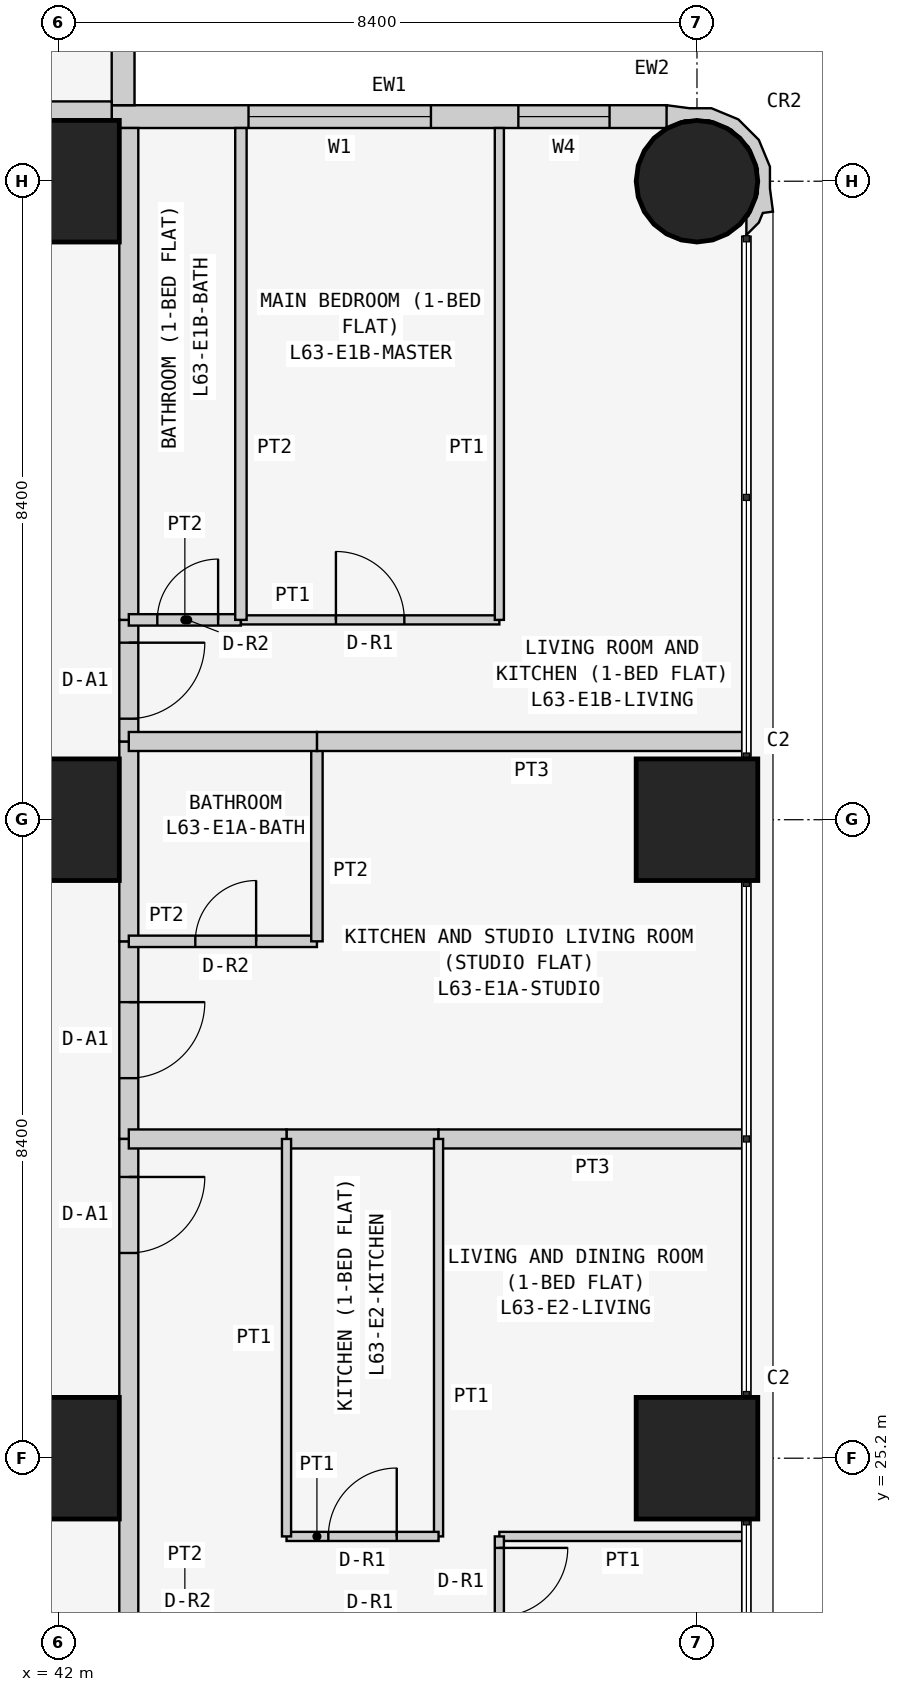
"""IFC4 building model, lengths in metres.
Left out: names, types, materials, properties, quantities, classifications, styles, units other than length and angle.
Written with IfcOpenShell. Run it as: python <this file> out.ifc"""

import sys

from ifc_helpers import new_model, si_unit, direction, frame, frame_2d, origin, origin_2d, place, context, subcontext, project, spatial, polyline, rectangle, circle, outline, extrude, element, fill, save


model = new_model("IFC4")
c1 = context("Model", 3, precision=1e-05, world=origin(), true_north=direction((0.0, 1.0)))
c2 = subcontext(c1, "Body", "Model", "MODEL_VIEW")
j1 = project(units=[si_unit("LENGTHUNIT", "METRE"), si_unit("PLANEANGLEUNIT", "RADIAN")], contexts=[c1])
p1 = place(None, origin())
s1 = spatial("IfcSite", under=j1, at=p1, CompositionType="ELEMENT")
p2 = place(p1, origin())
s2 = spatial("IfcBuilding", under=s1, at=p2, CompositionType="ELEMENT")
p3 = place(p2, frame((0.0, 0.0, 240.9)))
s3 = spatial("IfcBuildingStorey", under=s2, at=p3, CompositionType="ELEMENT", Elevation=240.9)
for number, where, z_axis, x_axis in (
    (1, (42.0, 25.2, 0.0), (0.0, 0.0, 1.0), (1.0, 0.0, 0.0)),
    (2, (42.0, 33.6, 0.0), (0.0, 0.0, 1.0), (1.0, 0.0, 0.0)),
    (3, (42.0, 42.0, 0.0), (0.0, 0.0, 1.0), (1.0, 0.0, 0.0)),
    (4, (50.4, 25.2, 0.0), (0.0, 0.0, 1.0), (1.0, 0.0, 0.0)),
    (5, (50.4, 33.6, 0.0), (0.0, 0.0, 1.0), (1.0, 0.0, 0.0)),
):
    element("IfcColumn", number, at=place(p3, frame(where, z_axis=z_axis, x_axis=x_axis)), inside=s3, PredefinedType="COLUMN", context=c2, shape_type="SweptSolid", body=[
        extrude(rectangle(XDim=1.6, YDim=1.6, at=origin_2d()), origin(), (0.0, 0.0, 1.0), 3.6),
    ])
p4 = place(p3, frame((50.4, 42.0, 0.0), z_axis=(0.0, 0.0, 1.0), x_axis=(1.0, 0.0, 0.0)))
e6 = element("IfcColumn", 6, at=p4, inside=s3, PredefinedType="COLUMN", context=c2, shape_type="SweptSolid", body=[
    extrude(circle(Radius=0.8, at=origin_2d()), origin(), (0.0, 0.0, 1.0), 3.6),
])
p5 = place(p3, frame((50.0, 42.85, 0.0), z_axis=(0.0, 0.0, 1.0), x_axis=(-1.0, 0.0, 0.0)))
e7 = element("IfcWall", 7, at=p5, inside=s3, PredefinedType="SOLIDWALL", context=c2, shape_type="SweptSolid", body=[
    extrude(rectangle(XDim=7.3, YDim=0.3, at=frame_2d((3.65, 0.0))), origin(), (0.0, 0.0, 1.0), 3.45),
])
p6 = place(p5, frame((3.1, 0.0, 0.9)))
e8 = element("IfcOpeningElement", 8, at=p6, cuts=e7, PredefinedType="OPENING", context=c2, shape_type="SweptSolid", body=[
    extrude(rectangle(XDim=2.4, YDim=1.5, at=frame_2d((1.2, 0.75))), frame((0.0, 0.16, 0.0), z_axis=(0.0, -1.0, 0.0), x_axis=(1.0, 0.0, 0.0)), (0.0, 0.0, 1.0), 0.32),
])
p7 = place(p5, frame((0.75, 0.0, 0.9)))
e9 = element("IfcOpeningElement", 9, at=p7, cuts=e7, PredefinedType="OPENING", context=c2, shape_type="SweptSolid", body=[
    extrude(rectangle(XDim=1.2, YDim=1.5, at=frame_2d((0.6, 0.75))), frame((0.0, 0.16, 0.0), z_axis=(0.0, -1.0, 0.0), x_axis=(1.0, 0.0, 0.0)), (0.0, 0.0, 1.0), 0.32),
])
p8 = place(p3, frame((42.85, 43.0, 0.0), z_axis=(0.0, 0.0, 1.0), x_axis=(0.0, 1.0, 0.0)))
e10 = element("IfcWall", 10, at=p8, inside=s3, PredefinedType="SOLIDWALL", context=c2, shape_type="SweptSolid", body=[
    extrude(rectangle(XDim=7.0, YDim=0.3, at=frame_2d((3.5, 0.0))), origin(), (0.0, 0.0, 1.0), 3.45),
])
p9 = place(p8, frame((1.5, 0.0, 0.9)))
e11 = element("IfcOpeningElement", 11, at=p9, cuts=e10, PredefinedType="OPENING", context=c2, shape_type="SweptSolid", body=[
    extrude(rectangle(XDim=2.4, YDim=1.5, at=frame_2d((1.2, 0.75))), frame((0.0, 0.16, 0.0), z_axis=(0.0, -1.0, 0.0), x_axis=(1.0, 0.0, 0.0)), (0.0, 0.0, 1.0), 0.32),
])
p10 = place(p8, frame((5.05, 0.0, 0.9)))
e12 = element("IfcOpeningElement", 12, at=p10, cuts=e10, PredefinedType="OPENING", context=c2, shape_type="SweptSolid", body=[
    extrude(rectangle(XDim=1.2, YDim=1.5, at=frame_2d((0.6, 0.75))), frame((0.0, 0.16, 0.0), z_axis=(0.0, -1.0, 0.0), x_axis=(1.0, 0.0, 0.0)), (0.0, 0.0, 1.0), 0.32),
])
p11 = place(p3, frame((50.995, 41.352, 0.0), z_axis=(0.0, 0.0, 1.0), x_axis=(0.93923434088, 0.343276641956, 0.0)))
e13 = element("IfcWall", 13, at=p11, inside=s3, PredefinedType="SOLIDWALL", context=c2, shape_type="SweptSolid", body=[
    extrude(outline(polyline([(0.532, 0.393), (0.631, 0.663), (0.614, 1.044), (0.453, 1.391), (0.172, 1.649), (-0.098, 1.748), (-0.369, 1.89), (-0.509, 1.621), (-0.491, 1.615), (-0.479, 1.609), (-0.211, 1.62), (0.088, 1.511), (0.323, 1.295), (0.457, 1.006), (0.47, 0.688), (0.361, 0.389), (0.145, 0.154), (0.108, 0.136), (0.031, -0.075), (0.241, 0.023), (0.333, 0.124), (0.465, 0.094), (0.532, 0.393)])), origin(), (0.0, 0.0, 1.0), 3.45),
])
p12 = place(p3, frame((35.829, 42.925, 0.0), z_axis=(0.0, 0.0, 1.0), x_axis=(1.0, 0.0, 0.0)))
e14 = element("IfcWall", 14, at=p12, inside=s3, PredefinedType="PARTITIONING", context=c2, shape_type="SweptSolid", body=[
    extrude(rectangle(XDim=6.871, YDim=0.25, at=frame_2d((3.436, 0.0))), origin(), (0.0, 0.0, 1.0), 3.45),
])
p13 = place(p3, frame((42.925, 32.0, 0.0), z_axis=(0.0, 0.0, 1.0), x_axis=(0.0, -1.0, 0.0)))
e15 = element("IfcWall", 15, at=p13, inside=s3, PredefinedType="PARTITIONING", context=c2, shape_type="SweptSolid", body=[
    extrude(rectangle(XDim=2.6, YDim=0.25, at=frame_2d((1.3, 0.0))), origin(), (0.0, 0.0, 1.0), 3.45),
])
p14 = place(p13, frame((0.8, 0.0, 0.0)))
e16 = element("IfcOpeningElement", 16, at=p14, cuts=e15, PredefinedType="OPENING", context=c2, shape_type="SweptSolid", body=[
    extrude(rectangle(XDim=1.0, YDim=2.1, at=frame_2d((0.5, 1.05))), frame((0.0, 0.135, 0.0), z_axis=(0.0, -1.0, 0.0), x_axis=(1.0, 0.0, 0.0)), (0.0, 0.0, 1.0), 0.27),
])
p15 = place(p3, frame((42.925, 34.629, 0.0), z_axis=(0.0, 0.0, 1.0), x_axis=(0.0, -1.0, 0.0)))
e17 = element("IfcWall", 17, at=p15, inside=s3, PredefinedType="PARTITIONING", context=c2, shape_type="SweptSolid", body=[
    extrude(rectangle(XDim=2.629, YDim=0.25, at=frame_2d((1.314, 0.0))), origin(), (0.0, 0.0, 1.0), 3.45),
])
p16 = place(p3, frame((42.925, 36.229, 0.0), z_axis=(0.0, 0.0, 1.0), x_axis=(0.0, -1.0, 0.0)))
e18 = element("IfcWall", 18, at=p16, inside=s3, PredefinedType="PARTITIONING", context=c2, shape_type="SweptSolid", body=[
    extrude(rectangle(XDim=1.6, YDim=0.25, at=frame_2d((0.8, 0.0))), origin(), (0.0, 0.0, 1.0), 3.45),
])
p17 = place(p16, frame((0.3, 0.0, 0.0)))
e19 = element("IfcOpeningElement", 19, at=p17, cuts=e18, PredefinedType="OPENING", context=c2, shape_type="SweptSolid", body=[
    extrude(rectangle(XDim=1.0, YDim=2.1, at=frame_2d((0.5, 1.05))), frame((0.0, 0.135, 0.0), z_axis=(0.0, -1.0, 0.0), x_axis=(1.0, 0.0, 0.0)), (0.0, 0.0, 1.0), 0.27),
])
p18 = place(p3, frame((42.925, 42.7, 0.0), z_axis=(0.0, 0.0, 1.0), x_axis=(0.0, -1.0, 0.0)))
e20 = element("IfcWall", 20, at=p18, inside=s3, PredefinedType="PARTITIONING", context=c2, shape_type="SweptSolid", body=[
    extrude(rectangle(XDim=6.471, YDim=0.25, at=frame_2d((3.235, 0.0))), origin(), (0.0, 0.0, 1.0), 3.45),
])
p19 = place(p3, frame((42.925, 29.4, 0.0), z_axis=(0.0, 0.0, 1.0), x_axis=(0.0, -1.0, 0.0)))
e21 = element("IfcWall", 21, at=p19, inside=s3, PredefinedType="PARTITIONING", context=c2, shape_type="SweptSolid", body=[
    extrude(rectangle(XDim=6.429, YDim=0.25, at=frame_2d((3.214, 0.0))), origin(), (0.0, 0.0, 1.0), 3.45),
])
p20 = place(p19, frame((0.5, 0.0, 0.0)))
e22 = element("IfcOpeningElement", 22, at=p20, cuts=e21, PredefinedType="OPENING", context=c2, shape_type="SweptSolid", body=[
    extrude(rectangle(XDim=1.0, YDim=2.1, at=frame_2d((0.5, 1.05))), frame((0.0, 0.135, 0.0), z_axis=(0.0, -1.0, 0.0), x_axis=(1.0, 0.0, 0.0)), (0.0, 0.0, 1.0), 0.27),
])
p21 = place(p3, frame((42.925, 32.0, 0.0), z_axis=(0.0, 0.0, 1.0), x_axis=(1.0, 0.0, 0.0)))
e23 = element("IfcWall", 23, at=p21, inside=s3, PredefinedType="PARTITIONING", context=c2, shape_type="SweptSolid", body=[
    extrude(rectangle(XDim=2.475, YDim=0.15, at=frame_2d((1.237, 0.0))), origin(), (0.0, 0.0, 1.0), 3.45),
])
p22 = place(p21, frame((0.875, 0.0, 0.0)))
e24 = element("IfcOpeningElement", 24, at=p22, cuts=e23, PredefinedType="OPENING", context=c2, shape_type="SweptSolid", body=[
    extrude(rectangle(XDim=0.8, YDim=2.1, at=frame_2d((0.4, 1.05))), frame((0.0, 0.085, 0.0), z_axis=(0.0, -1.0, 0.0), x_axis=(1.0, 0.0, 0.0)), (0.0, 0.0, 1.0), 0.17),
])
p23 = place(p3, frame((45.4, 32.0, 0.0), z_axis=(0.0, 0.0, 1.0), x_axis=(0.0, 1.0, 0.0)))
e25 = element("IfcWall", 25, at=p23, inside=s3, PredefinedType="PARTITIONING", context=c2, shape_type="SweptSolid", body=[
    extrude(rectangle(XDim=2.629, YDim=0.15, at=frame_2d((1.314, 0.0))), origin(), (0.0, 0.0, 1.0), 3.45),
])
p24 = place(p3, frame((45.4, 34.629, 0.0), z_axis=(0.0, 0.0, 1.0), x_axis=(1.0, 0.0, 0.0)))
e26 = element("IfcWall", 26, at=p24, inside=s3, PredefinedType="PARTITIONING", context=c2, shape_type="SweptSolid", body=[
    extrude(rectangle(XDim=5.65, YDim=0.25, at=frame_2d((2.825, 0.0))), origin(), (0.0, 0.0, 1.0), 3.45),
])
p25 = place(p3, frame((47.0, 29.4, 0.0), z_axis=(0.0, 0.0, 1.0), x_axis=(-1.0, 0.0, 0.0)))
e27 = element("IfcWall", 27, at=p25, inside=s3, PredefinedType="PARTITIONING", context=c2, shape_type="SweptSolid", body=[
    extrude(rectangle(XDim=2.0, YDim=0.25, at=frame_2d((1.0, 0.0))), origin(), (0.0, 0.0, 1.0), 3.45),
])
p26 = place(p3, frame((45.0, 29.4, 0.0), z_axis=(0.0, 0.0, 1.0), x_axis=(-1.0, 0.0, 0.0)))
e28 = element("IfcWall", 28, at=p26, inside=s3, PredefinedType="PARTITIONING", context=c2, shape_type="SweptSolid", body=[
    extrude(rectangle(XDim=2.075, YDim=0.25, at=frame_2d((1.038, 0.0))), origin(), (0.0, 0.0, 1.0), 3.45),
])
p27 = place(p3, frame((51.05, 29.4, 0.0), z_axis=(0.0, 0.0, 1.0), x_axis=(-1.0, 0.0, 0.0)))
e29 = element("IfcWall", 29, at=p27, inside=s3, PredefinedType="PARTITIONING", context=c2, shape_type="SweptSolid", body=[
    extrude(rectangle(XDim=4.05, YDim=0.25, at=frame_2d((2.025, 0.0))), origin(), (0.0, 0.0, 1.0), 3.45),
])
p28 = place(p3, frame((45.4, 34.629, 0.0), z_axis=(0.0, 0.0, 1.0), x_axis=(-1.0, 0.0, 0.0)))
e30 = element("IfcWall", 30, at=p28, inside=s3, PredefinedType="PARTITIONING", context=c2, shape_type="SweptSolid", body=[
    extrude(rectangle(XDim=2.475, YDim=0.25, at=frame_2d((1.237, 0.0))), origin(), (0.0, 0.0, 1.0), 3.45),
])
p29 = place(p3, frame((42.925, 36.229, 0.0), z_axis=(0.0, 0.0, 1.0), x_axis=(1.0, 0.0, 0.0)))
e31 = element("IfcWall", 31, at=p29, inside=s3, PredefinedType="PARTITIONING", context=c2, shape_type="SweptSolid", body=[
    extrude(rectangle(XDim=1.475, YDim=0.15, at=frame_2d((0.737, 0.0))), origin(), (0.0, 0.0, 1.0), 3.45),
])
p30 = place(p29, frame((0.375, 0.0, 0.0)))
e32 = element("IfcOpeningElement", 32, at=p30, cuts=e31, PredefinedType="OPENING", context=c2, shape_type="SweptSolid", body=[
    extrude(rectangle(XDim=0.8, YDim=2.1, at=frame_2d((0.4, 1.05))), frame((0.0, 0.085, 0.0), z_axis=(0.0, -1.0, 0.0), x_axis=(1.0, 0.0, 0.0)), (0.0, 0.0, 1.0), 0.17),
])
p31 = place(p3, frame((44.4, 36.229, 0.0), z_axis=(0.0, 0.0, 1.0), x_axis=(1.0, 0.0, 0.0)))
e33 = element("IfcWall", 33, at=p31, inside=s3, PredefinedType="PARTITIONING", context=c2, shape_type="SweptSolid", body=[
    extrude(rectangle(XDim=3.4, YDim=0.12, at=frame_2d((1.7, 0.0))), origin(), (0.0, 0.0, 1.0), 3.45),
])
p32 = place(p31, frame((1.25, 0.0, 0.0)))
e34 = element("IfcOpeningElement", 34, at=p32, cuts=e33, PredefinedType="OPENING", context=c2, shape_type="SweptSolid", body=[
    extrude(rectangle(XDim=0.9, YDim=2.1, at=frame_2d((0.45, 1.05))), frame((0.0, 0.07, 0.0), z_axis=(0.0, -1.0, 0.0), x_axis=(1.0, 0.0, 0.0)), (0.0, 0.0, 1.0), 0.14),
])
p33 = place(p3, frame((47.8, 36.229, 0.0), z_axis=(0.0, 0.0, 1.0), x_axis=(0.0, 1.0, 0.0)))
e35 = element("IfcWall", 35, at=p33, inside=s3, PredefinedType="PARTITIONING", context=c2, shape_type="SweptSolid", body=[
    extrude(rectangle(XDim=6.471, YDim=0.12, at=frame_2d((3.235, 0.0))), origin(), (0.0, 0.0, 1.0), 3.45),
])
p34 = place(p3, frame((44.4, 36.229, 0.0), z_axis=(0.0, 0.0, 1.0), x_axis=(0.0, 1.0, 0.0)))
e36 = element("IfcWall", 36, at=p34, inside=s3, PredefinedType="PARTITIONING", context=c2, shape_type="SweptSolid", body=[
    extrude(rectangle(XDim=6.471, YDim=0.15, at=frame_2d((3.235, 0.0))), origin(), (0.0, 0.0, 1.0), 3.45),
])
p35 = place(p3, frame((47.0, 29.4, 0.0), z_axis=(0.0, 0.0, 1.0), x_axis=(0.0, -1.0, 0.0)))
e37 = element("IfcWall", 37, at=p35, inside=s3, PredefinedType="PARTITIONING", context=c2, shape_type="SweptSolid", body=[
    extrude(rectangle(XDim=5.229, YDim=0.12, at=frame_2d((2.615, 0.0))), origin(), (0.0, 0.0, 1.0), 3.45),
])
p36 = place(p3, frame((47.0, 24.171, 0.0), z_axis=(0.0, 0.0, 1.0), x_axis=(-1.0, 0.0, 0.0)))
e38 = element("IfcWall", 38, at=p36, inside=s3, PredefinedType="PARTITIONING", context=c2, shape_type="SweptSolid", body=[
    extrude(rectangle(XDim=2.0, YDim=0.12, at=frame_2d((1.0, 0.0))), origin(), (0.0, 0.0, 1.0), 3.45),
])
p37 = place(p36, frame((0.55, 0.0, 0.0)))
e39 = element("IfcOpeningElement", 39, at=p37, cuts=e38, PredefinedType="OPENING", context=c2, shape_type="SweptSolid", body=[
    extrude(rectangle(XDim=0.9, YDim=2.1, at=frame_2d((0.45, 1.05))), frame((0.0, 0.07, 0.0), z_axis=(0.0, -1.0, 0.0), x_axis=(1.0, 0.0, 0.0)), (0.0, 0.0, 1.0), 0.14),
])
p38 = place(p3, frame((45.0, 24.171, 0.0), z_axis=(0.0, 0.0, 1.0), x_axis=(0.0, 1.0, 0.0)))
e40 = element("IfcWall", 40, at=p38, inside=s3, PredefinedType="PARTITIONING", context=c2, shape_type="SweptSolid", body=[
    extrude(rectangle(XDim=5.229, YDim=0.12, at=frame_2d((2.615, 0.0))), origin(), (0.0, 0.0, 1.0), 3.45),
])
p39 = place(p3, frame((51.05, 24.171, 0.0), z_axis=(0.0, 0.0, 1.0), x_axis=(-1.0, 0.0, 0.0)))
e41 = element("IfcWall", 41, at=p39, inside=s3, PredefinedType="PARTITIONING", context=c2, shape_type="SweptSolid", body=[
    extrude(rectangle(XDim=3.25, YDim=0.12, at=frame_2d((1.625, 0.0))), origin(), (0.0, 0.0, 1.0), 3.45),
])
p40 = place(p3, frame((47.8, 24.171, 0.0), z_axis=(0.0, 0.0, 1.0), x_axis=(0.0, -1.0, 0.0)))
e42 = element("IfcWall", 42, at=p40, inside=s3, PredefinedType="PARTITIONING", context=c2, shape_type="SweptSolid", body=[
    extrude(rectangle(XDim=1.2, YDim=0.12, at=frame_2d((0.6, 0.0))), origin(), (0.0, 0.0, 1.0), 3.45),
])
p41 = place(p40, frame((0.151, 0.0, 0.0)))
e43 = element("IfcOpeningElement", 43, at=p41, cuts=e42, PredefinedType="OPENING", context=c2, shape_type="SweptSolid", body=[
    extrude(rectangle(XDim=0.9, YDim=2.1, at=frame_2d((0.45, 1.05))), frame((0.0, 0.07, 0.0), z_axis=(0.0, -1.0, 0.0), x_axis=(1.0, 0.0, 0.0)), (0.0, 0.0, 1.0), 0.14),
])
p42 = place(p6, origin())
e44 = element("IfcWindow", 44, at=p42, inside=s3, PartitioningType="SINGLE_PANEL", PredefinedType="WINDOW", context=c2, shape_type="SweptSolid", body=[
    extrude(rectangle(XDim=2.4, YDim=1.5, at=frame_2d((1.2, 0.75))), frame((0.0, 0.03, 0.0), z_axis=(0.0, -1.0, 0.0), x_axis=(1.0, 0.0, 0.0)), (0.0, 0.0, 1.0), 0.06),
])
fill(e8, e44)
p43 = place(p7, origin())
e45 = element("IfcWindow", 45, at=p43, inside=s3, PartitioningType="SINGLE_PANEL", PredefinedType="WINDOW", context=c2, shape_type="SweptSolid", body=[
    extrude(rectangle(XDim=1.2, YDim=1.5, at=frame_2d((0.6, 0.75))), frame((0.0, 0.03, 0.0), z_axis=(0.0, -1.0, 0.0), x_axis=(1.0, 0.0, 0.0)), (0.0, 0.0, 1.0), 0.06),
])
fill(e9, e45)
p44 = place(p14, origin())
e46 = element("IfcDoor", 46, at=p44, inside=s3, OperationType="SINGLE_SWING_LEFT", PredefinedType="DOOR", context=c2, shape_type="SweptSolid", body=[
    extrude(rectangle(XDim=1.0, YDim=2.1, at=frame_2d((0.5, 1.05))), frame((0.0, 0.025, 0.0), z_axis=(0.0, -1.0, 0.0), x_axis=(1.0, 0.0, 0.0)), (0.0, 0.0, 1.0), 0.05),
])
fill(e16, e46)
p45 = place(p22, origin())
e47 = element("IfcDoor", 47, at=p45, inside=s3, OperationType="SINGLE_SWING_RIGHT", PredefinedType="DOOR", context=c2, shape_type="SweptSolid", body=[
    extrude(rectangle(XDim=0.8, YDim=2.1, at=frame_2d((0.4, 1.05))), frame((0.0, 0.025, 0.0), z_axis=(0.0, -1.0, 0.0), x_axis=(1.0, 0.0, 0.0)), (0.0, 0.0, 1.0), 0.05),
])
fill(e24, e47)
p46 = place(p17, origin())
e48 = element("IfcDoor", 48, at=p46, inside=s3, OperationType="SINGLE_SWING_LEFT", PredefinedType="DOOR", context=c2, shape_type="SweptSolid", body=[
    extrude(rectangle(XDim=1.0, YDim=2.1, at=frame_2d((0.5, 1.05))), frame((0.0, 0.025, 0.0), z_axis=(0.0, -1.0, 0.0), x_axis=(1.0, 0.0, 0.0)), (0.0, 0.0, 1.0), 0.05),
])
fill(e19, e48)
p47 = place(p30, origin())
e49 = element("IfcDoor", 49, at=p47, inside=s3, OperationType="SINGLE_SWING_RIGHT", PredefinedType="DOOR", context=c2, shape_type="SweptSolid", body=[
    extrude(rectangle(XDim=0.8, YDim=2.1, at=frame_2d((0.4, 1.05))), frame((0.0, 0.025, 0.0), z_axis=(0.0, -1.0, 0.0), x_axis=(1.0, 0.0, 0.0)), (0.0, 0.0, 1.0), 0.05),
])
fill(e32, e49)
p48 = place(p32, origin())
e50 = element("IfcDoor", 50, at=p48, inside=s3, OperationType="SINGLE_SWING_LEFT", PredefinedType="DOOR", context=c2, shape_type="SweptSolid", body=[
    extrude(rectangle(XDim=0.9, YDim=2.1, at=frame_2d((0.45, 1.05))), frame((0.0, 0.025, 0.0), z_axis=(0.0, -1.0, 0.0), x_axis=(1.0, 0.0, 0.0)), (0.0, 0.0, 1.0), 0.05),
])
fill(e34, e50)
p49 = place(p20, origin())
e51 = element("IfcDoor", 51, at=p49, inside=s3, OperationType="SINGLE_SWING_LEFT", PredefinedType="DOOR", context=c2, shape_type="SweptSolid", body=[
    extrude(rectangle(XDim=1.0, YDim=2.1, at=frame_2d((0.5, 1.05))), frame((0.0, 0.025, 0.0), z_axis=(0.0, -1.0, 0.0), x_axis=(1.0, 0.0, 0.0)), (0.0, 0.0, 1.0), 0.05),
])
fill(e22, e51)
p50 = place(p37, frame((0.9, 0.0, 0.0), z_axis=(0.0, 0.0, 1.0), x_axis=(-1.0, 0.0, 0.0)))
e52 = element("IfcDoor", 52, at=p50, inside=s3, OperationType="SINGLE_SWING_RIGHT", PredefinedType="DOOR", context=c2, shape_type="SweptSolid", body=[
    extrude(rectangle(XDim=0.9, YDim=2.1, at=frame_2d((0.45, 1.05))), frame((0.0, 0.025, 0.0), z_axis=(0.0, -1.0, 0.0), x_axis=(1.0, 0.0, 0.0)), (0.0, 0.0, 1.0), 0.05),
])
fill(e39, e52)
p51 = place(p41, origin())
e53 = element("IfcDoor", 53, at=p51, inside=s3, OperationType="SINGLE_SWING_LEFT", PredefinedType="DOOR", context=c2, shape_type="SweptSolid", body=[
    extrude(rectangle(XDim=0.9, YDim=2.1, at=frame_2d((0.45, 1.05))), frame((0.0, 0.025, 0.0), z_axis=(0.0, -1.0, 0.0), x_axis=(1.0, 0.0, 0.0)), (0.0, 0.0, 1.0), 0.05),
])
fill(e43, e53)
save(model, sys.argv[1])
